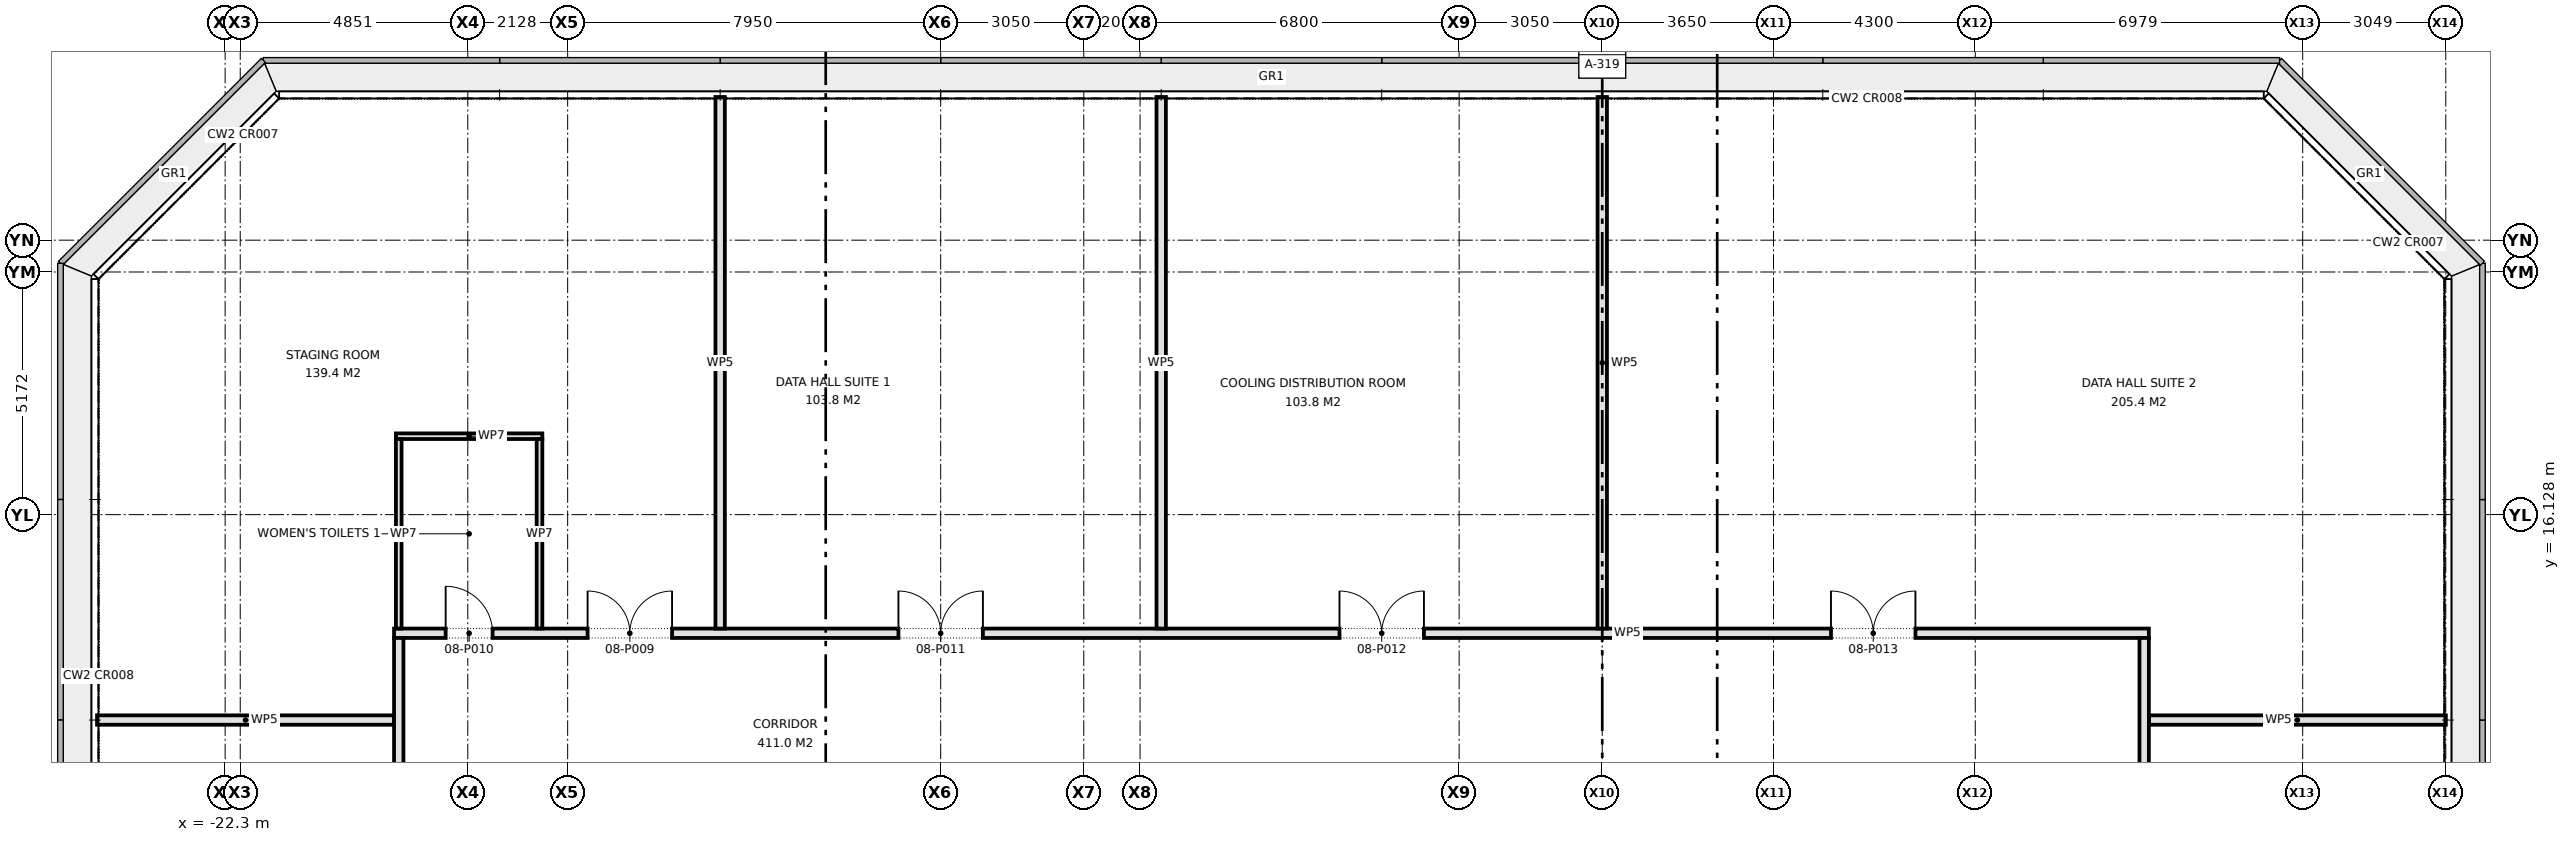
"""IFC4 building model, lengths in metres.
Left out: names, types, materials, properties, quantities, classifications, styles, units other than length and angle.
Written with IfcOpenShell. Run it as: python <this file> out.ifc"""

import sys

from ifc_helpers import new_model, si_unit, direction, frame, frame_2d, origin, place, context, subcontext, project, spatial, rectangle, extrude, element, fill, save


model = new_model("IFC4")
c1 = context("Model", 3, precision=1e-05, world=origin(), true_north=direction((0.0, 1.0)))
c2 = subcontext(c1, "Body", "Model", "MODEL_VIEW")
j1 = project(units=[si_unit("LENGTHUNIT", "METRE"), si_unit("PLANEANGLEUNIT", "RADIAN")], contexts=[c1])
p1 = place(None, origin())
s1 = spatial("IfcSite", under=j1, at=p1, CompositionType="ELEMENT")
p2 = place(p1, origin())
s2 = spatial("IfcBuilding", under=s1, at=p2, CompositionType="ELEMENT")
p3 = place(p2, frame((0.0, 0.0, 35.3)))
s3 = spatial("IfcBuildingStorey", under=s2, at=p3, CompositionType="ELEMENT", Elevation=35.3)
for number, where, z_axis, x_axis in (
    (1, (-25.03, 11.75, 0.0), (0.0, 0.0, 1.0), (1.0, 0.0, 0.0)),
    (2, (18.7, 11.75, 0.0), (0.0, 0.0, 1.0), (1.0, 0.0, 0.0)),
):
    element("IfcWall", number, at=place(p3, frame(where, z_axis=z_axis, x_axis=x_axis)), inside=s3, PredefinedType="PARTITIONING", context=c2, shape_type="SweptSolid", body=[
        extrude(rectangle(XDim=6.33, YDim=0.2, at=frame_2d((3.165, 0.0))), origin(), (0.0, 0.0, 1.0), 4.575),
    ])
p4 = place(p3, frame((-18.7, 13.6, 0.0), z_axis=(0.0, 0.0, 1.0), x_axis=(1.0, 0.0, 0.0)))
e3 = element("IfcWall", 3, at=p4, inside=s3, PredefinedType="PARTITIONING", context=c2, shape_type="SweptSolid", body=[
    extrude(rectangle(XDim=37.4, YDim=0.2, at=frame_2d((18.7, 0.0))), origin(), (0.0, 0.0, 1.0), 4.575),
])
p5 = place(p4, frame((4.125, 0.0, 0.0)))
e4 = element("IfcOpeningElement", 4, at=p5, cuts=e3, PredefinedType="OPENING", context=c2, shape_type="SweptSolid", body=[
    extrude(rectangle(XDim=1.8, YDim=2.1, at=frame_2d((0.9, 1.05))), frame((0.0, 0.11, 0.0), z_axis=(0.0, -1.0, 0.0), x_axis=(1.0, 0.0, 0.0)), (0.0, 0.0, 1.0), 0.22),
])
p6 = place(p4, frame((1.1, 0.0, 0.0)))
e5 = element("IfcOpeningElement", 5, at=p6, cuts=e3, PredefinedType="OPENING", context=c2, shape_type="SweptSolid", body=[
    extrude(rectangle(XDim=1.0, YDim=2.1, at=frame_2d((0.5, 1.05))), frame((0.0, 0.11, 0.0), z_axis=(0.0, -1.0, 0.0), x_axis=(1.0, 0.0, 0.0)), (0.0, 0.0, 1.0), 0.22),
])
p7 = place(p4, frame((10.75, 0.0, 0.0)))
e6 = element("IfcOpeningElement", 6, at=p7, cuts=e3, PredefinedType="OPENING", context=c2, shape_type="SweptSolid", body=[
    extrude(rectangle(XDim=1.8, YDim=2.1, at=frame_2d((0.9, 1.05))), frame((0.0, 0.11, 0.0), z_axis=(0.0, -1.0, 0.0), x_axis=(1.0, 0.0, 0.0)), (0.0, 0.0, 1.0), 0.22),
])
p8 = place(p4, frame((20.15, 0.0, 0.0)))
e7 = element("IfcOpeningElement", 7, at=p8, cuts=e3, PredefinedType="OPENING", context=c2, shape_type="SweptSolid", body=[
    extrude(rectangle(XDim=1.8, YDim=2.1, at=frame_2d((0.9, 1.05))), frame((0.0, 0.11, 0.0), z_axis=(0.0, -1.0, 0.0), x_axis=(1.0, 0.0, 0.0)), (0.0, 0.0, 1.0), 0.22),
])
p9 = place(p4, frame((30.625, 0.0, 0.0)))
e8 = element("IfcOpeningElement", 8, at=p9, cuts=e3, PredefinedType="OPENING", context=c2, shape_type="SweptSolid", body=[
    extrude(rectangle(XDim=1.8, YDim=2.1, at=frame_2d((0.9, 1.05))), frame((0.0, 0.11, 0.0), z_axis=(0.0, -1.0, 0.0), x_axis=(1.0, 0.0, 0.0)), (0.0, 0.0, 1.0), 0.22),
])
p10 = place(p3, frame((18.6, -13.5, 0.0), z_axis=(0.0, 0.0, 1.0), x_axis=(0.0, 1.0, 0.0)))
e9 = element("IfcWall", 9, at=p10, inside=s3, PredefinedType="PARTITIONING", context=c2, shape_type="SweptSolid", body=[
    extrude(rectangle(XDim=27.0, YDim=0.2, at=frame_2d((13.5, 0.0))), origin(), (0.0, 0.0, 1.0), 4.575),
])
p11 = place(p10, frame((5.55, 0.0, 0.0)))
e10 = element("IfcOpeningElement", 10, at=p11, cuts=e9, PredefinedType="OPENING", context=c2, shape_type="SweptSolid", body=[
    extrude(rectangle(XDim=1.8, YDim=2.1, at=frame_2d((0.9, 1.05))), frame((0.0, 0.11, 0.0), z_axis=(0.0, -1.0, 0.0), x_axis=(1.0, 0.0, 0.0)), (0.0, 0.0, 1.0), 0.22),
])
p12 = place(p10, frame((21.7, 0.0, 0.0)))
e11 = element("IfcOpeningElement", 11, at=p12, cuts=e9, PredefinedType="OPENING", context=c2, shape_type="SweptSolid", body=[
    extrude(rectangle(XDim=1.2, YDim=2.1, at=frame_2d((0.6, 1.05))), frame((0.0, 0.11, 0.0), z_axis=(0.0, -1.0, 0.0), x_axis=(1.0, 0.0, 0.0)), (0.0, 0.0, 1.0), 0.22),
])
p13 = place(p10, frame((12.15, 0.0, 0.0)))
e12 = element("IfcOpeningElement", 12, at=p13, cuts=e9, PredefinedType="OPENING", context=c2, shape_type="SweptSolid", body=[
    extrude(rectangle(XDim=1.0, YDim=2.1, at=frame_2d((0.5, 1.05))), frame((0.0, 0.11, 0.0), z_axis=(0.0, -1.0, 0.0), x_axis=(1.0, 0.0, 0.0)), (0.0, 0.0, 1.0), 0.22),
])
p14 = place(p10, frame((15.15, 0.0, 0.0)))
e13 = element("IfcOpeningElement", 13, at=p14, cuts=e9, PredefinedType="OPENING", context=c2, shape_type="SweptSolid", body=[
    extrude(rectangle(XDim=1.0, YDim=2.1, at=frame_2d((0.5, 1.05))), frame((0.0, 0.11, 0.0), z_axis=(0.0, -1.0, 0.0), x_axis=(1.0, 0.0, 0.0)), (0.0, 0.0, 1.0), 0.22),
])
p15 = place(p10, frame((17.75, 0.0, 0.0)))
e14 = element("IfcOpeningElement", 14, at=p15, cuts=e9, PredefinedType="OPENING", context=c2, shape_type="SweptSolid", body=[
    extrude(rectangle(XDim=1.0, YDim=2.1, at=frame_2d((0.5, 1.05))), frame((0.0, 0.11, 0.0), z_axis=(0.0, -1.0, 0.0), x_axis=(1.0, 0.0, 0.0)), (0.0, 0.0, 1.0), 0.22),
])
for number, where, z_axis, x_axis in (
    (15, (7.05, 13.7, 0.0), (0.0, 0.0, 1.0), (0.0, 1.0, 0.0)),
    (16, (-2.35, 13.7, 0.0), (0.0, 0.0, 1.0), (0.0, 1.0, 0.0)),
    (17, (-11.75, 13.7, 0.0), (0.0, 0.0, 1.0), (0.0, 1.0, 0.0)),
):
    element("IfcWall", number, at=place(p3, frame(where, z_axis=z_axis, x_axis=x_axis)), inside=s3, PredefinedType="PARTITIONING", context=c2, shape_type="SweptSolid", body=[
        extrude(rectangle(XDim=11.33, YDim=0.2, at=frame_2d((5.665, 0.0))), origin(), (0.0, 0.0, 1.0), 4.575),
    ])
p16 = place(p3, frame((-18.6, -13.5, 0.0), z_axis=(0.0, 0.0, 1.0), x_axis=(0.0, 1.0, 0.0)))
e18 = element("IfcWall", 18, at=p16, inside=s3, PredefinedType="PARTITIONING", context=c2, shape_type="SweptSolid", body=[
    extrude(rectangle(XDim=27.0, YDim=0.2, at=frame_2d((13.5, 0.0))), origin(), (0.0, 0.0, 1.0), 4.575),
])
p17 = place(p16, frame((12.6, 0.0, 0.0)))
e19 = element("IfcOpeningElement", 19, at=p17, cuts=e18, PredefinedType="OPENING", context=c2, shape_type="SweptSolid", body=[
    extrude(rectangle(XDim=1.8, YDim=2.1, at=frame_2d((0.9, 1.05))), frame((0.0, 0.11, 0.0), z_axis=(0.0, -1.0, 0.0), x_axis=(1.0, 0.0, 0.0)), (0.0, 0.0, 1.0), 0.22),
])
p18 = place(p3, frame((-18.66, 17.8, 0.0), z_axis=(0.0, 0.0, 1.0), x_axis=(1.0, 0.0, 0.0)))
e20 = element("IfcWall", 20, at=p18, inside=s3, PredefinedType="PARTITIONING", context=c2, shape_type="SweptSolid", body=[
    extrude(rectangle(XDim=3.12, YDim=0.12, at=frame_2d((1.56, 0.0))), origin(), (0.0, 0.0, 1.0), 4.575),
])
for number, where, z_axis, x_axis in (
    (21, (-15.6, 13.7, 0.0), (0.0, 0.0, 1.0), (0.0, 1.0, 0.0)),
    (22, (-18.6, 13.7, 0.0), (0.0, 0.0, 1.0), (0.0, 1.0, 0.0)),
):
    element("IfcWall", number, at=place(p3, frame(where, z_axis=z_axis, x_axis=x_axis)), inside=s3, PredefinedType="PARTITIONING", context=c2, shape_type="SweptSolid", body=[
        extrude(rectangle(XDim=4.04, YDim=0.12, at=frame_2d((2.02, 0.0))), origin(), (0.0, 0.0, 1.0), 4.575),
    ])
p19 = place(p5, origin())
e23 = element("IfcDoor", 23, at=p19, inside=s3, OperationType="DOUBLE_DOOR_SINGLE_SWING", PredefinedType="DOOR", context=c2, shape_type="SweptSolid", body=[
    extrude(rectangle(XDim=1.8, YDim=2.1, at=frame_2d((0.9, 1.05))), frame((0.0, 0.025, 0.0), z_axis=(0.0, -1.0, 0.0), x_axis=(1.0, 0.0, 0.0)), (0.0, 0.0, 1.0), 0.05),
])
fill(e4, e23)
p20 = place(p6, origin())
e24 = element("IfcDoor", 24, at=p20, inside=s3, OperationType="SINGLE_SWING_LEFT", PredefinedType="DOOR", context=c2, shape_type="SweptSolid", body=[
    extrude(rectangle(XDim=1.0, YDim=2.1, at=frame_2d((0.5, 1.05))), frame((0.0, 0.025, 0.0), z_axis=(0.0, -1.0, 0.0), x_axis=(1.0, 0.0, 0.0)), (0.0, 0.0, 1.0), 0.05),
])
fill(e5, e24)
p21 = place(p7, origin())
e25 = element("IfcDoor", 25, at=p21, inside=s3, OperationType="DOUBLE_DOOR_SINGLE_SWING", PredefinedType="DOOR", context=c2, shape_type="SweptSolid", body=[
    extrude(rectangle(XDim=1.8, YDim=2.1, at=frame_2d((0.9, 1.05))), frame((0.0, 0.025, 0.0), z_axis=(0.0, -1.0, 0.0), x_axis=(1.0, 0.0, 0.0)), (0.0, 0.0, 1.0), 0.05),
])
fill(e6, e25)
p22 = place(p8, origin())
e26 = element("IfcDoor", 26, at=p22, inside=s3, OperationType="DOUBLE_DOOR_SINGLE_SWING", PredefinedType="DOOR", context=c2, shape_type="SweptSolid", body=[
    extrude(rectangle(XDim=1.8, YDim=2.1, at=frame_2d((0.9, 1.05))), frame((0.0, 0.025, 0.0), z_axis=(0.0, -1.0, 0.0), x_axis=(1.0, 0.0, 0.0)), (0.0, 0.0, 1.0), 0.05),
])
fill(e7, e26)
p23 = place(p9, origin())
e27 = element("IfcDoor", 27, at=p23, inside=s3, OperationType="DOUBLE_DOOR_SINGLE_SWING", PredefinedType="DOOR", context=c2, shape_type="SweptSolid", body=[
    extrude(rectangle(XDim=1.8, YDim=2.1, at=frame_2d((0.9, 1.05))), frame((0.0, 0.025, 0.0), z_axis=(0.0, -1.0, 0.0), x_axis=(1.0, 0.0, 0.0)), (0.0, 0.0, 1.0), 0.05),
])
fill(e8, e27)
save(model, sys.argv[1])
